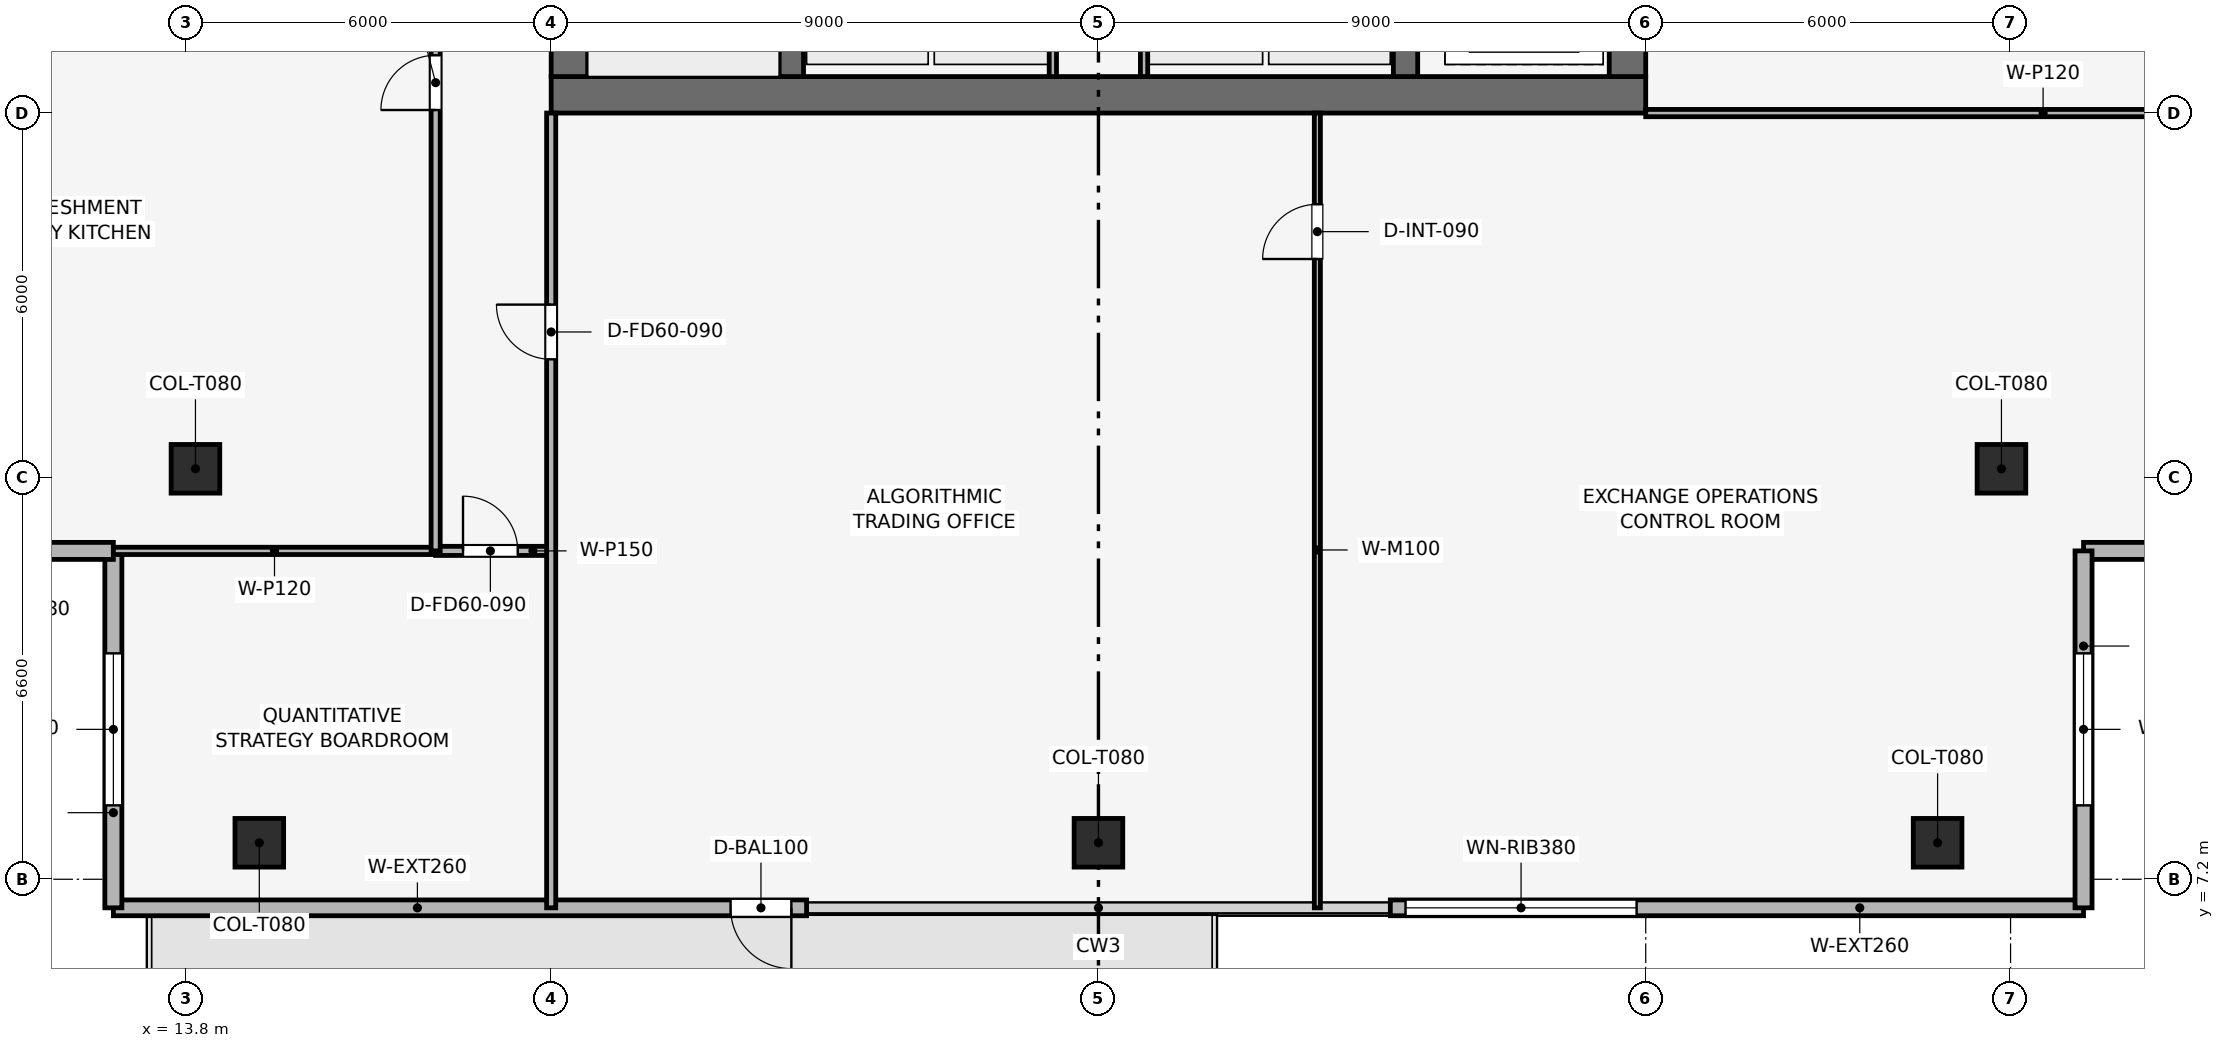
"""IFC4 building model, lengths in metres.
Left out: names, types, materials, properties, quantities, classifications, styles, units other than length and angle.
Written with IfcOpenShell. Run it as: python <this file> out.ifc"""

import sys

from ifc_helpers import new_model, si_unit, direction, frame, frame_2d, origin, origin_2d, place, context, subcontext, project, spatial, rectangle, extrude, element, fill, save


model = new_model("IFC4")
c1 = context("Model", 3, precision=1e-05, world=origin(), true_north=direction((0.0, 1.0)))
c2 = subcontext(c1, "Body", "Model", "MODEL_VIEW")
j1 = project(units=[si_unit("LENGTHUNIT", "METRE"), si_unit("PLANEANGLEUNIT", "RADIAN")], contexts=[c1])
p1 = place(None, origin())
s1 = spatial("IfcSite", under=j1, at=p1, CompositionType="ELEMENT")
p2 = place(p1, origin())
s2 = spatial("IfcBuilding", under=s1, at=p2, CompositionType="ELEMENT")
p3 = place(p2, frame((0.0, 0.0, 336.75)))
s3 = spatial("IfcBuildingStorey", under=s2, at=p3, CompositionType="ELEMENT", Elevation=336.75)
p4 = place(p3, frame((19.8, 20.1, 0.0), z_axis=(0.0, 0.0, 1.0), x_axis=(1.0, 0.0, 0.0)))
e1 = element("IfcWall", 1, at=p4, inside=s3, PredefinedType="SHEAR", context=c2, shape_type="SweptSolid", body=[
    extrude(rectangle(XDim=18.0, YDim=0.6, at=frame_2d((9.0, 0.0))), origin(), (0.0, 0.0, 1.0), 3.75),
])
p5 = place(p3, frame((20.1, 20.4, 0.0), z_axis=(0.0, 0.0, 1.0), x_axis=(0.0, 1.0, 0.0)))
e2 = element("IfcWall", 2, at=p5, inside=s3, PredefinedType="SHEAR", context=c2, shape_type="SweptSolid", body=[
    extrude(rectangle(XDim=16.8, YDim=0.6, at=frame_2d((8.4, 0.0))), origin(), (0.0, 0.0, 1.0), 3.75),
])
p6 = place(p5, frame((10.4, 0.0, 0.0)))
e3 = element("IfcOpeningElement", 3, at=p6, cuts=e2, PredefinedType="OPENING", context=c2, shape_type="SweptSolid", body=[
    extrude(rectangle(XDim=1.1, YDim=2.15, at=frame_2d((0.55, 1.075))), frame((0.0, 0.31, 0.0), z_axis=(0.0, -1.0, 0.0), x_axis=(1.0, 0.0, 0.0)), (0.0, 0.0, 1.0), 0.62),
])
p7 = place(p3, frame((37.5, 20.4, 0.0), z_axis=(0.0, 0.0, 1.0), x_axis=(0.0, 1.0, 0.0)))
e4 = element("IfcWall", 4, at=p7, inside=s3, PredefinedType="SHEAR", context=c2, shape_type="SweptSolid", body=[
    extrude(rectangle(XDim=16.8, YDim=0.6, at=frame_2d((8.4, 0.0))), origin(), (0.0, 0.0, 1.0), 3.75),
])
p8 = place(p7, frame((4.9, 0.0, 0.0)))
e5 = element("IfcOpeningElement", 5, at=p8, cuts=e4, PredefinedType="OPENING", context=c2, shape_type="SweptSolid", body=[
    extrude(rectangle(XDim=1.1, YDim=2.15, at=frame_2d((0.55, 1.075))), frame((0.0, 0.31, 0.0), z_axis=(0.0, -1.0, 0.0), x_axis=(1.0, 0.0, 0.0)), (0.0, 0.0, 1.0), 0.62),
])
for number, where, z_axis, x_axis in (
    (6, (23.75, 20.4, 0.0), (0.0, 0.0, 1.0), (0.0, 1.0, 0.0)),
    (7, (33.85, 20.4, 0.0), (0.0, 0.0, 1.0), (0.0, 1.0, 0.0)),
):
    element("IfcWall", number, at=place(p3, frame(where, z_axis=z_axis, x_axis=x_axis)), inside=s3, PredefinedType="SHEAR", context=c2, shape_type="SweptSolid", body=[
        extrude(rectangle(XDim=16.8, YDim=0.4, at=frame_2d((8.4, 0.0))), origin(), (0.0, 0.0, 1.0), 3.75),
    ])
for number, where, z_axis, x_axis in (
    (8, (15.0, 7.8, 0.003), (0.0, 0.0, 1.0), (1.0, 0.0, 0.0)),
    (9, (28.8, 7.8, 0.003), (0.0, 0.0, 1.0), (1.0, 0.0, 0.0)),
    (10, (42.6, 7.8, 0.003), (0.0, 0.0, 1.0), (1.0, 0.0, 0.0)),
    (11, (13.95, 13.95, 0.003), (0.0, 0.0, 1.0), (1.0, 0.0, 0.0)),
    (12, (43.65, 13.95, 0.003), (0.0, 0.0, 1.0), (1.0, 0.0, 0.0)),
):
    element("IfcColumn", number, at=place(p3, frame(where, z_axis=z_axis, x_axis=x_axis)), inside=s3, PredefinedType="COLUMN", context=c2, shape_type="SweptSolid", body=[
        extrude(rectangle(XDim=0.8, YDim=0.8, at=origin_2d()), origin(), (0.0, 0.0, 1.0), 3.504),
    ])
p9 = place(p3, frame((45.0, 6.73, 0.0), z_axis=(0.0, 0.0, 1.0), x_axis=(-1.0, 0.0, 0.0)))
e13 = element("IfcWall", 13, at=p9, inside=s3, PredefinedType="SOLIDWALL", context=c2, shape_type="SweptSolid", body=[
    extrude(rectangle(XDim=11.4, YDim=0.26, at=frame_2d((5.7, 0.0))), origin(), (0.0, 0.0, 1.0), 3.51),
])
p10 = place(p9, frame((7.35, 0.0, 0.9)))
e14 = element("IfcOpeningElement", 14, at=p10, cuts=e13, PredefinedType="OPENING", context=c2, shape_type="SweptSolid", body=[
    extrude(rectangle(XDim=3.8, YDim=1.9, at=frame_2d((1.9, 0.95))), frame((0.0, 0.14, 0.0), z_axis=(0.0, -1.0, 0.0), x_axis=(1.0, 0.0, 0.0)), (0.0, 0.0, 1.0), 0.28),
])
p11 = place(p3, frame((24.0, 6.73, 0.0), z_axis=(0.0, 0.0, 1.0), x_axis=(-1.0, 0.0, 0.0)))
e15 = element("IfcWall", 15, at=p11, inside=s3, PredefinedType="SOLIDWALL", context=c2, shape_type="SweptSolid", body=[
    extrude(rectangle(XDim=11.4, YDim=0.26, at=frame_2d((5.7, 0.0))), origin(), (0.0, 0.0, 1.0), 3.51),
])
p12 = place(p11, frame((0.25, 0.0, 0.0)))
e16 = element("IfcOpeningElement", 16, at=p12, cuts=e15, PredefinedType="OPENING", context=c2, shape_type="SweptSolid", body=[
    extrude(rectangle(XDim=1.0, YDim=2.2, at=frame_2d((0.5, 1.1))), frame((0.0, 0.14, 0.0), z_axis=(0.0, -1.0, 0.0), x_axis=(1.0, 0.0, 0.0)), (0.0, 0.0, 1.0), 0.28),
])
p13 = place(p3, frame((12.6, 6.73, 0.0), z_axis=(0.0, 0.0, 1.0), x_axis=(0.0, 1.0, 0.0)))
e17 = element("IfcWall", 17, at=p13, inside=s3, PredefinedType="SOLIDWALL", context=c2, shape_type="SweptSolid", body=[
    extrude(rectangle(XDim=5.87, YDim=0.28, at=frame_2d((2.935, 0.0))), origin(), (0.0, 0.0, 1.0), 3.51),
])
p14 = place(p13, frame((1.685, 0.0, 0.9)))
e18 = element("IfcOpeningElement", 18, at=p14, cuts=e17, PredefinedType="OPENING", context=c2, shape_type="SweptSolid", body=[
    extrude(rectangle(XDim=2.5, YDim=1.9, at=frame_2d((1.25, 0.95))), frame((0.0, 0.15, 0.0), z_axis=(0.0, -1.0, 0.0), x_axis=(1.0, 0.0, 0.0)), (0.0, 0.0, 1.0), 0.3),
])
p15 = place(p3, frame((12.6, 12.6, 0.0), z_axis=(0.0, 0.0, 1.0), x_axis=(-1.0, 0.0, 0.0)))
e19 = element("IfcWall", 19, at=p15, inside=s3, PredefinedType="SOLIDWALL", context=c2, shape_type="SweptSolid", body=[
    extrude(rectangle(XDim=5.87, YDim=0.28, at=frame_2d((2.935, 0.0))), origin(), (0.0, 0.0, 1.0), 3.51),
])
p16 = place(p15, frame((1.685, 0.0, 0.9)))
e20 = element("IfcOpeningElement", 20, at=p16, cuts=e19, PredefinedType="OPENING", context=c2, shape_type="SweptSolid", body=[
    extrude(rectangle(XDim=2.5, YDim=1.9, at=frame_2d((1.25, 0.95))), frame((0.0, 0.15, 0.0), z_axis=(0.0, -1.0, 0.0), x_axis=(1.0, 0.0, 0.0)), (0.0, 0.0, 1.0), 0.3),
])
p17 = place(p3, frame((50.87, 12.6, 0.0), z_axis=(0.0, 0.0, 1.0), x_axis=(-1.0, 0.0, 0.0)))
e21 = element("IfcWall", 21, at=p17, inside=s3, PredefinedType="SOLIDWALL", context=c2, shape_type="SweptSolid", body=[
    extrude(rectangle(XDim=5.87, YDim=0.28, at=frame_2d((2.935, 0.0))), origin(), (0.0, 0.0, 1.0), 3.51),
])
p18 = place(p17, frame((1.685, 0.0, 0.9)))
e22 = element("IfcOpeningElement", 22, at=p18, cuts=e21, PredefinedType="OPENING", context=c2, shape_type="SweptSolid", body=[
    extrude(rectangle(XDim=2.5, YDim=1.9, at=frame_2d((1.25, 0.95))), frame((0.0, 0.15, 0.0), z_axis=(0.0, -1.0, 0.0), x_axis=(1.0, 0.0, 0.0)), (0.0, 0.0, 1.0), 0.3),
])
p19 = place(p3, frame((45.0, 12.6, 0.0), z_axis=(0.0, 0.0, 1.0), x_axis=(0.0, -1.0, 0.0)))
e23 = element("IfcWall", 23, at=p19, inside=s3, PredefinedType="SOLIDWALL", context=c2, shape_type="SweptSolid", body=[
    extrude(rectangle(XDim=5.87, YDim=0.28, at=frame_2d((2.935, 0.0))), origin(), (0.0, 0.0, 1.0), 3.51),
])
p20 = place(p19, frame((1.685, 0.0, 0.9)))
e24 = element("IfcOpeningElement", 24, at=p20, cuts=e23, PredefinedType="OPENING", context=c2, shape_type="SweptSolid", body=[
    extrude(rectangle(XDim=2.5, YDim=1.9, at=frame_2d((1.25, 0.95))), frame((0.0, 0.15, 0.0), z_axis=(0.0, -1.0, 0.0), x_axis=(1.0, 0.0, 0.0)), (0.0, 0.0, 1.0), 0.3),
])
p21 = place(p3, frame((28.05, 20.4, 0.0), z_axis=(0.0, 0.0, 1.0), x_axis=(0.0, 1.0, 0.0)))
e25 = element("IfcWall", 25, at=p21, inside=s3, PredefinedType="PARTITIONING", context=c2, shape_type="SweptSolid", body=[
    extrude(rectangle(XDim=8.15, YDim=0.12, at=frame_2d((4.075, 0.0))), origin(), (0.0, 0.0, 1.0), 3.51),
])
p22 = place(p3, frame((29.55, 20.4, 0.0), z_axis=(0.0, 0.0, 1.0), x_axis=(0.0, 1.0, 0.0)))
e26 = element("IfcWall", 26, at=p22, inside=s3, PredefinedType="PARTITIONING", context=c2, shape_type="SweptSolid", body=[
    extrude(rectangle(XDim=2.75, YDim=0.12, at=frame_2d((1.375, 0.0))), origin(), (0.0, 0.0, 1.0), 3.51),
])
p23 = place(p3, frame((12.6, 12.6, 0.0), z_axis=(0.0, 0.0, 1.0), x_axis=(1.0, 0.0, 0.0)))
e27 = element("IfcWall", 27, at=p23, inside=s3, PredefinedType="PARTITIONING", context=c2, shape_type="SweptSolid", body=[
    extrude(rectangle(XDim=5.3, YDim=0.12, at=frame_2d((2.65, 0.0))), origin(), (0.0, 0.0, 1.0), 3.195),
])
p24 = place(p3, frame((17.9, 12.6, 0.0), z_axis=(0.0, 0.0, 1.0), x_axis=(1.0, 0.0, 0.0)))
e28 = element("IfcWall", 28, at=p24, inside=s3, PredefinedType="PARTITIONING", context=c2, shape_type="SweptSolid", body=[
    extrude(rectangle(XDim=1.9, YDim=0.15, at=frame_2d((0.95, 0.0))), origin(), (0.0, 0.0, 1.0), 3.51),
])
p25 = place(p24, frame((0.45, 0.0, 0.0)))
e29 = element("IfcOpeningElement", 29, at=p25, cuts=e28, PredefinedType="OPENING", context=c2, shape_type="SweptSolid", body=[
    extrude(rectangle(XDim=0.9, YDim=2.1, at=frame_2d((0.45, 1.05))), frame((0.0, 0.085, 0.0), z_axis=(0.0, -1.0, 0.0), x_axis=(1.0, 0.0, 0.0)), (0.0, 0.0, 1.0), 0.17),
])
p26 = place(p3, frame((19.8, 6.73, 0.0), z_axis=(0.0, 0.0, 1.0), x_axis=(0.0, 1.0, 0.0)))
e30 = element("IfcWall", 30, at=p26, inside=s3, PredefinedType="PARTITIONING", context=c2, shape_type="SweptSolid", body=[
    extrude(rectangle(XDim=13.07, YDim=0.15, at=frame_2d((6.535, 0.0))), origin(), (0.0, 0.0, 1.0), 3.095),
])
p27 = place(p26, frame((9.02, 0.0, 0.0)))
e31 = element("IfcOpeningElement", 31, at=p27, cuts=e30, PredefinedType="OPENING", context=c2, shape_type="SweptSolid", body=[
    extrude(rectangle(XDim=0.9, YDim=2.1, at=frame_2d((0.45, 1.05))), frame((0.0, 0.085, 0.0), z_axis=(0.0, -1.0, 0.0), x_axis=(1.0, 0.0, 0.0)), (0.0, 0.0, 1.0), 0.17),
])
p28 = place(p3, frame((32.4, 6.73, 0.0), z_axis=(0.0, 0.0, 1.0), x_axis=(0.0, 1.0, 0.0)))
e32 = element("IfcWall", 32, at=p28, inside=s3, PredefinedType="MOVABLE", context=c2, shape_type="SweptSolid", body=[
    extrude(rectangle(XDim=13.07, YDim=0.1, at=frame_2d((6.535, 0.0))), origin(), (0.0, 0.0, 1.0), 3.135),
])
p29 = place(p28, frame((10.67, 0.0, 0.0)))
e33 = element("IfcOpeningElement", 33, at=p29, cuts=e32, PredefinedType="OPENING", context=c2, shape_type="SweptSolid", body=[
    extrude(rectangle(XDim=0.9, YDim=2.1, at=frame_2d((0.45, 1.05))), frame((0.0, 0.06, 0.0), z_axis=(0.0, -1.0, 0.0), x_axis=(1.0, 0.0, 0.0)), (0.0, 0.0, 1.0), 0.12),
])
p30 = place(p3, frame((37.8, 19.8, 0.0), z_axis=(0.0, 0.0, 1.0), x_axis=(1.0, 0.0, 0.0)))
e34 = element("IfcWall", 34, at=p30, inside=s3, PredefinedType="PARTITIONING", context=c2, shape_type="SweptSolid", body=[
    extrude(rectangle(XDim=13.07, YDim=0.12, at=frame_2d((6.535, 0.0))), origin(), (0.0, 0.0, 1.0), 3.095),
])
p31 = place(p3, frame((17.9, 12.6, 0.0), z_axis=(0.0, 0.0, 1.0), x_axis=(0.0, 1.0, 0.0)))
e35 = element("IfcWall", 35, at=p31, inside=s3, PredefinedType="PARTITIONING", context=c2, shape_type="SweptSolid", body=[
    extrude(rectangle(XDim=27.1, YDim=0.15, at=frame_2d((13.55, 0.0))), origin(), (0.0, 0.0, 1.0), 3.095),
])
p32 = place(p31, frame((7.25, 0.0, 0.0)))
e36 = element("IfcOpeningElement", 36, at=p32, cuts=e35, PredefinedType="OPENING", context=c2, shape_type="SweptSolid", body=[
    extrude(rectangle(XDim=0.9, YDim=2.1, at=frame_2d((0.45, 1.05))), frame((0.0, 0.085, 0.0), z_axis=(0.0, -1.0, 0.0), x_axis=(1.0, 0.0, 0.0)), (0.0, 0.0, 1.0), 0.17),
])
p33 = place(p31, frame((16.35, 0.0, 0.0)))
e37 = element("IfcOpeningElement", 37, at=p33, cuts=e35, PredefinedType="OPENING", context=c2, shape_type="SweptSolid", body=[
    extrude(rectangle(XDim=0.9, YDim=2.1, at=frame_2d((0.45, 1.05))), frame((0.0, 0.085, 0.0), z_axis=(0.0, -1.0, 0.0), x_axis=(1.0, 0.0, 0.0)), (0.0, 0.0, 1.0), 0.17),
])
p34 = place(p31, frame((19.25, 0.0, 0.0)))
e38 = element("IfcOpeningElement", 38, at=p34, cuts=e35, PredefinedType="OPENING", context=c2, shape_type="SweptSolid", body=[
    extrude(rectangle(XDim=0.9, YDim=2.1, at=frame_2d((0.45, 1.05))), frame((0.0, 0.085, 0.0), z_axis=(0.0, -1.0, 0.0), x_axis=(1.0, 0.0, 0.0)), (0.0, 0.0, 1.0), 0.17),
])
p35 = place(p31, frame((22.0, 0.0, 0.0)))
e39 = element("IfcOpeningElement", 39, at=p35, cuts=e35, PredefinedType="OPENING", context=c2, shape_type="SweptSolid", body=[
    extrude(rectangle(XDim=0.95, YDim=2.1, at=frame_2d((0.475, 1.05))), frame((0.0, 0.085, 0.0), z_axis=(0.0, -1.0, 0.0), x_axis=(1.0, 0.0, 0.0)), (0.0, 0.0, 1.0), 0.17),
])
p36 = place(p31, frame((25.0, 0.0, 0.0)))
e40 = element("IfcOpeningElement", 40, at=p36, cuts=e35, PredefinedType="OPENING", context=c2, shape_type="SweptSolid", body=[
    extrude(rectangle(XDim=0.9, YDim=2.1, at=frame_2d((0.45, 1.05))), frame((0.0, 0.085, 0.0), z_axis=(0.0, -1.0, 0.0), x_axis=(1.0, 0.0, 0.0)), (0.0, 0.0, 1.0), 0.17),
])
p37 = place(p12, origin())
e41 = element("IfcDoor", 41, at=p37, inside=s3, OperationType="SINGLE_SWING_LEFT", PredefinedType="DOOR", context=c2, shape_type="SweptSolid", body=[
    extrude(rectangle(XDim=1.0, YDim=2.2, at=frame_2d((0.5, 1.1))), frame((0.0, 0.025, 0.0), z_axis=(0.0, -1.0, 0.0), x_axis=(1.0, 0.0, 0.0)), (0.0, 0.0, 1.0), 0.05),
])
fill(e16, e41)
p38 = place(p10, origin())
e42 = element("IfcWindow", 42, at=p38, inside=s3, PartitioningType="SINGLE_PANEL", PredefinedType="WINDOW", context=c2, shape_type="SweptSolid", body=[
    extrude(rectangle(XDim=3.8, YDim=1.9, at=frame_2d((1.9, 0.95))), frame((0.0, 0.03, 0.0), z_axis=(0.0, -1.0, 0.0), x_axis=(1.0, 0.0, 0.0)), (0.0, 0.0, 1.0), 0.06),
])
fill(e14, e42)
p39 = place(p14, origin())
e43 = element("IfcWindow", 43, at=p39, inside=s3, PartitioningType="SINGLE_PANEL", PredefinedType="WINDOW", context=c2, shape_type="SweptSolid", body=[
    extrude(rectangle(XDim=2.5, YDim=1.9, at=frame_2d((1.25, 0.95))), frame((0.0, 0.03, 0.0), z_axis=(0.0, -1.0, 0.0), x_axis=(1.0, 0.0, 0.0)), (0.0, 0.0, 1.0), 0.06),
])
fill(e18, e43)
p40 = place(p20, origin())
e44 = element("IfcWindow", 44, at=p40, inside=s3, PartitioningType="SINGLE_PANEL", PredefinedType="WINDOW", context=c2, shape_type="SweptSolid", body=[
    extrude(rectangle(XDim=2.5, YDim=1.9, at=frame_2d((1.25, 0.95))), frame((0.0, 0.03, 0.0), z_axis=(0.0, -1.0, 0.0), x_axis=(1.0, 0.0, 0.0)), (0.0, 0.0, 1.0), 0.06),
])
fill(e24, e44)
p41 = place(p25, origin())
e45 = element("IfcDoor", 45, at=p41, inside=s3, OperationType="SINGLE_SWING_LEFT", PredefinedType="DOOR", context=c2, shape_type="SweptSolid", body=[
    extrude(rectangle(XDim=0.9, YDim=2.1, at=frame_2d((0.45, 1.05))), frame((0.0, 0.025, 0.0), z_axis=(0.0, -1.0, 0.0), x_axis=(1.0, 0.0, 0.0)), (0.0, 0.0, 1.0), 0.05),
])
fill(e29, e45)
p42 = place(p27, origin())
e46 = element("IfcDoor", 46, at=p42, inside=s3, OperationType="SINGLE_SWING_RIGHT", PredefinedType="DOOR", context=c2, shape_type="SweptSolid", body=[
    extrude(rectangle(XDim=0.9, YDim=2.1, at=frame_2d((0.45, 1.05))), frame((0.0, 0.025, 0.0), z_axis=(0.0, -1.0, 0.0), x_axis=(1.0, 0.0, 0.0)), (0.0, 0.0, 1.0), 0.05),
])
fill(e31, e46)
p43 = place(p29, origin())
e47 = element("IfcDoor", 47, at=p43, inside=s3, OperationType="SINGLE_SWING_LEFT", PredefinedType="DOOR", context=c2, shape_type="SweptSolid", body=[
    extrude(rectangle(XDim=0.9, YDim=2.1, at=frame_2d((0.45, 1.05))), frame((0.0, 0.025, 0.0), z_axis=(0.0, -1.0, 0.0), x_axis=(1.0, 0.0, 0.0)), (0.0, 0.0, 1.0), 0.05),
])
fill(e33, e47)
p44 = place(p32, origin())
e48 = element("IfcDoor", 48, at=p44, inside=s3, OperationType="SINGLE_SWING_LEFT", PredefinedType="DOOR", context=c2, shape_type="SweptSolid", body=[
    extrude(rectangle(XDim=0.9, YDim=2.1, at=frame_2d((0.45, 1.05))), frame((0.0, 0.025, 0.0), z_axis=(0.0, -1.0, 0.0), x_axis=(1.0, 0.0, 0.0)), (0.0, 0.0, 1.0), 0.05),
])
fill(e36, e48)
save(model, sys.argv[1])
